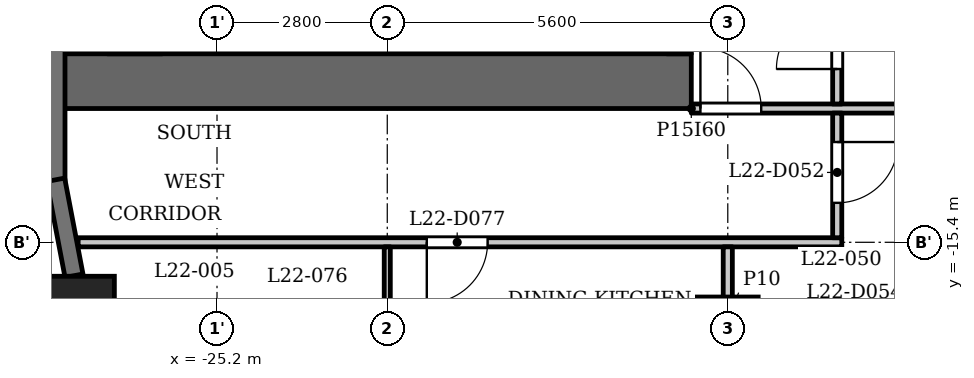
"""IFC4 building model, lengths in metres.
Left out: names, types, materials, properties, quantities, classifications, styles, units other than length and angle.
Written with IfcOpenShell. Run it as: python <this file> out.ifc"""

import sys

from ifc_helpers import new_model, si_unit, direction, frame, frame_2d, origin, origin_2d, place, context, subcontext, project, spatial, rectangle, extrude, element, fill, save


model = new_model("IFC4")
c1 = context("Model", 3, precision=1e-05, world=origin(), true_north=direction((0.0, 1.0)))
c2 = subcontext(c1, "Body", "Model", "MODEL_VIEW")
j1 = project(units=[si_unit("LENGTHUNIT", "METRE"), si_unit("PLANEANGLEUNIT", "RADIAN")], contexts=[c1])
p1 = place(None, origin())
s1 = spatial("IfcSite", under=j1, at=p1, CompositionType="ELEMENT")
p2 = place(p1, origin())
s2 = spatial("IfcBuilding", under=s1, at=p2, CompositionType="ELEMENT")
p3 = place(p2, frame((0.0, 0.0, 90.3)))
s3 = spatial("IfcBuildingStorey", under=s2, at=p3, CompositionType="ELEMENT", Elevation=90.3)
p4 = place(p3, frame((-27.538, -16.609, 0.0), z_axis=(0.0, 0.0, 1.0), x_axis=(1.0, 0.0, 0.0)))
e1 = element("IfcColumn", 1, at=p4, inside=s3, PredefinedType="COLUMN", context=c2, shape_type="SweptSolid", body=[
    extrude(rectangle(XDim=1.3, YDim=1.3, at=origin_2d()), origin(), (0.0, 0.0, 1.0), 3.5),
])
p5 = place(p3, frame((-16.8, -16.8, 0.0), z_axis=(0.0, 0.0, 1.0), x_axis=(1.0, 0.0, 0.0)))
e2 = element("IfcColumn", 2, at=p5, inside=s3, PredefinedType="COLUMN", context=c2, shape_type="SweptSolid", body=[
    extrude(rectangle(XDim=1.0, YDim=1.0, at=origin_2d()), origin(), (0.0, 0.0, 1.0), 3.5),
])
p6 = place(p3, frame((-27.85, -11.85, 0.0), z_axis=(0.0, 0.0, 1.0), x_axis=(0.0, -1.0, 0.0)))
e3 = element("IfcWall", 3, at=p6, inside=s3, PredefinedType="SOLIDWALL", context=c2, shape_type="SweptSolid", body=[
    extrude(rectangle(XDim=2.55, YDim=0.3, at=frame_2d((1.275, 0.0))), origin(), (0.0, 0.0, 1.0), 2.4),
])
p7 = place(p3, frame((-27.853, -14.372, 0.0), z_axis=(0.0, 0.0, 1.0), x_axis=(0.187279751651, -0.982306619453, 0.0)))
e4 = element("IfcWall", 4, at=p7, inside=s3, PredefinedType="SOLIDWALL", context=c2, shape_type="SweptSolid", body=[
    extrude(rectangle(XDim=1.606, YDim=0.3, at=frame_2d((0.803, 0.0))), origin(), (0.0, 0.0, 1.0), 2.4),
])
p8 = place(p3, frame((-17.4, -12.75, 0.0), z_axis=(0.0, 0.0, 1.0), x_axis=(-1.0, 0.0, 0.0)))
e5 = element("IfcWall", 5, at=p8, inside=s3, PredefinedType="SHEAR", context=c2, shape_type="SweptSolid", body=[
    extrude(rectangle(XDim=10.4, YDim=0.9, at=frame_2d((5.2, 0.0))), origin(), (0.0, 0.0, 1.0), 3.2),
])
p9 = place(p3, frame((-17.6, -12.3, 0.0), z_axis=(0.0, 0.0, 1.0), x_axis=(0.0, 1.0, 0.0)))
e6 = element("IfcWall", 6, at=p9, inside=s3, PredefinedType="SHEAR", context=c2, shape_type="SweptSolid", body=[
    extrude(rectangle(XDim=24.6, YDim=0.4, at=frame_2d((12.3, 0.0))), origin(), (0.0, 0.0, 1.0), 3.2),
])
p10 = place(p9, frame((6.0, 0.0, 0.0)))
e7 = element("IfcOpeningElement", 7, at=p10, cuts=e6, PredefinedType="OPENING", context=c2, shape_type="SweptSolid", body=[
    extrude(rectangle(XDim=1.1, YDim=2.1, at=frame_2d((0.55, 1.05))), frame((0.0, 0.21, 0.0), z_axis=(0.0, -1.0, 0.0), x_axis=(1.0, 0.0, 0.0)), (0.0, 0.0, 1.0), 0.42),
])
p11 = place(p9, frame((8.4, 0.0, 0.0)))
e8 = element("IfcOpeningElement", 8, at=p11, cuts=e6, PredefinedType="OPENING", context=c2, shape_type="SweptSolid", body=[
    extrude(rectangle(XDim=1.1, YDim=2.1, at=frame_2d((0.55, 1.05))), frame((0.0, 0.21, 0.0), z_axis=(0.0, -1.0, 0.0), x_axis=(1.0, 0.0, 0.0)), (0.0, 0.0, 1.0), 0.42),
])
p12 = place(p9, frame((10.8, 0.0, 0.0)))
e9 = element("IfcOpeningElement", 9, at=p12, cuts=e6, PredefinedType="OPENING", context=c2, shape_type="SweptSolid", body=[
    extrude(rectangle(XDim=1.1, YDim=2.1, at=frame_2d((0.55, 1.05))), frame((0.0, 0.21, 0.0), z_axis=(0.0, -1.0, 0.0), x_axis=(1.0, 0.0, 0.0)), (0.0, 0.0, 1.0), 0.42),
])
p13 = place(p9, frame((16.75, 0.0, 0.0)))
e10 = element("IfcOpeningElement", 10, at=p13, cuts=e6, PredefinedType="OPENING", context=c2, shape_type="SweptSolid", body=[
    extrude(rectangle(XDim=0.9, YDim=2.1, at=frame_2d((0.45, 1.05))), frame((0.0, 0.21, 0.0), z_axis=(0.0, -1.0, 0.0), x_axis=(1.0, 0.0, 0.0)), (0.0, 0.0, 1.0), 0.42),
])
p14 = place(p9, frame((22.8, 0.0, 0.0)))
e11 = element("IfcOpeningElement", 11, at=p14, cuts=e6, PredefinedType="OPENING", context=c2, shape_type="SweptSolid", body=[
    extrude(rectangle(XDim=1.1, YDim=2.1, at=frame_2d((0.55, 1.05))), frame((0.0, 0.21, 0.0), z_axis=(0.0, -1.0, 0.0), x_axis=(1.0, 0.0, 0.0)), (0.0, 0.0, 1.0), 0.42),
])
p15 = place(p9, frame((0.7, 0.0, 0.0)))
e12 = element("IfcOpeningElement", 12, at=p15, cuts=e6, PredefinedType="OPENING", context=c2, shape_type="SweptSolid", body=[
    extrude(rectangle(XDim=1.1, YDim=2.1, at=frame_2d((0.55, 1.05))), frame((0.0, 0.21, 0.0), z_axis=(0.0, -1.0, 0.0), x_axis=(1.0, 0.0, 0.0)), (0.0, 0.0, 1.0), 0.42),
])
p16 = place(p9, frame((12.775, 0.0, 0.0)))
e13 = element("IfcOpeningElement", 13, at=p16, cuts=e6, PredefinedType="OPENING", context=c2, shape_type="SweptSolid", body=[
    extrude(rectangle(XDim=1.8, YDim=2.1, at=frame_2d((0.9, 1.05))), frame((0.0, 0.21, 0.0), z_axis=(0.0, -1.0, 0.0), x_axis=(1.0, 0.0, 0.0)), (0.0, 0.0, 1.0), 0.42),
])
p17 = place(p3, frame((-26.55, -12.3, 0.0), z_axis=(0.0, 0.0, 1.0), x_axis=(0.0, 1.0, 0.0)))
e14 = element("IfcWall", 14, at=p17, inside=s3, PredefinedType="SHEAR", context=c2, shape_type="SweptSolid", body=[
    extrude(rectangle(XDim=24.6, YDim=0.9, at=frame_2d((12.3, 0.0))), origin(), (0.0, 0.0, 1.0), 3.2),
])
p18 = place(p3, frame((-23.55, -12.3, 0.0), z_axis=(0.0, 0.0, 1.0), x_axis=(0.0, 1.0, 0.0)))
e15 = element("IfcWall", 15, at=p18, inside=s3, PredefinedType="PARTITIONING", context=c2, shape_type="SweptSolid", body=[
    extrude(rectangle(XDim=2.5, YDim=0.2, at=frame_2d((1.25, 0.0))), origin(), (0.0, 0.0, 1.0), 3.2),
])
p19 = place(p18, frame((0.8, 0.0, 0.0)))
e16 = element("IfcOpeningElement", 16, at=p19, cuts=e15, PredefinedType="OPENING", context=c2, shape_type="SweptSolid", body=[
    extrude(rectangle(XDim=0.9, YDim=2.1, at=frame_2d((0.45, 1.05))), frame((0.0, 0.11, 0.0), z_axis=(0.0, -1.0, 0.0), x_axis=(1.0, 0.0, 0.0)), (0.0, 0.0, 1.0), 0.22),
])
p20 = place(p3, frame((-27.484, -15.4, 0.0), z_axis=(0.0, 0.0, 1.0), x_axis=(1.0, 0.0, 0.0)))
e17 = element("IfcWall", 17, at=p20, inside=s3, PredefinedType="PARTITIONING", context=c2, shape_type="SweptSolid", body=[
    extrude(rectangle(XDim=12.559, YDim=0.15, at=frame_2d((6.279, 0.0))), origin(), (0.0, 0.0, 1.0), 3.2),
])
p21 = place(p20, frame((5.734, 0.0, 0.0)))
e18 = element("IfcOpeningElement", 18, at=p21, cuts=e17, PredefinedType="OPENING", context=c2, shape_type="SweptSolid", body=[
    extrude(rectangle(XDim=1.0, YDim=2.1, at=frame_2d((0.5, 1.05))), frame((0.0, 0.085, 0.0), z_axis=(0.0, -1.0, 0.0), x_axis=(1.0, 0.0, 0.0)), (0.0, 0.0, 1.0), 0.17),
])
p22 = place(p3, frame((-17.4, -13.2, 0.0), z_axis=(0.0, 0.0, 1.0), x_axis=(1.0, 0.0, 0.0)))
e19 = element("IfcWall", 19, at=p22, inside=s3, PredefinedType="PARTITIONING", context=c2, shape_type="SweptSolid", body=[
    extrude(rectangle(XDim=34.8, YDim=0.15, at=frame_2d((17.4, 0.0))), origin(), (0.0, 0.0, 1.0), 3.2),
])
p23 = place(p22, frame((0.15, 0.0, 0.0)))
e20 = element("IfcOpeningElement", 20, at=p23, cuts=e19, PredefinedType="OPENING", context=c2, shape_type="SweptSolid", body=[
    extrude(rectangle(XDim=1.0, YDim=2.1, at=frame_2d((0.5, 1.05))), frame((0.0, 0.085, 0.0), z_axis=(0.0, -1.0, 0.0), x_axis=(1.0, 0.0, 0.0)), (0.0, 0.0, 1.0), 0.17),
])
p24 = place(p22, frame((33.55, 0.0, 0.0)))
e21 = element("IfcOpeningElement", 21, at=p24, cuts=e19, PredefinedType="OPENING", context=c2, shape_type="SweptSolid", body=[
    extrude(rectangle(XDim=1.0, YDim=2.1, at=frame_2d((0.5, 1.05))), frame((0.0, 0.085, 0.0), z_axis=(0.0, -1.0, 0.0), x_axis=(1.0, 0.0, 0.0)), (0.0, 0.0, 1.0), 0.17),
])
p25 = place(p22, frame((7.35, 0.0, 0.0)))
e22 = element("IfcOpeningElement", 22, at=p25, cuts=e19, PredefinedType="OPENING", context=c2, shape_type="SweptSolid", body=[
    extrude(rectangle(XDim=1.0, YDim=2.1, at=frame_2d((0.5, 1.05))), frame((0.0, 0.085, 0.0), z_axis=(0.0, -1.0, 0.0), x_axis=(1.0, 0.0, 0.0)), (0.0, 0.0, 1.0), 0.17),
])
p26 = place(p22, frame((13.7, 0.0, 0.0)))
e23 = element("IfcOpeningElement", 23, at=p26, cuts=e19, PredefinedType="OPENING", context=c2, shape_type="SweptSolid", body=[
    extrude(rectangle(XDim=1.0, YDim=2.1, at=frame_2d((0.5, 1.05))), frame((0.0, 0.085, 0.0), z_axis=(0.0, -1.0, 0.0), x_axis=(1.0, 0.0, 0.0)), (0.0, 0.0, 1.0), 0.17),
])
p27 = place(p22, frame((19.3, 0.0, 0.0)))
e24 = element("IfcOpeningElement", 24, at=p27, cuts=e19, PredefinedType="OPENING", context=c2, shape_type="SweptSolid", body=[
    extrude(rectangle(XDim=1.0, YDim=2.1, at=frame_2d((0.5, 1.05))), frame((0.0, 0.085, 0.0), z_axis=(0.0, -1.0, 0.0), x_axis=(1.0, 0.0, 0.0)), (0.0, 0.0, 1.0), 0.17),
])
p28 = place(p3, frame((-22.4, -17.75, 0.0), z_axis=(0.0, 0.0, 1.0), x_axis=(0.0, 1.0, 0.0)))
e25 = element("IfcWall", 25, at=p28, inside=s3, PredefinedType="PARTITIONING", context=c2, shape_type="SweptSolid", body=[
    extrude(rectangle(XDim=2.275, YDim=0.1, at=frame_2d((1.137, 0.0))), origin(), (0.0, 0.0, 1.0), 3.2),
])
p29 = place(p3, frame((-16.8, -23.03, 0.0), z_axis=(0.0, 0.0, 1.0), x_axis=(0.0, 1.0, 0.0)))
e26 = element("IfcWall", 26, at=p29, inside=s3, PredefinedType="PARTITIONING", context=c2, shape_type="SweptSolid", body=[
    extrude(rectangle(XDim=7.555, YDim=0.15, at=frame_2d((3.777, 0.0))), origin(), (0.0, 0.0, 1.0), 3.2),
])
p30 = place(p3, frame((-15.0, -15.325, 0.0), z_axis=(0.0, 0.0, 1.0), x_axis=(0.0, 1.0, 0.0)))
e27 = element("IfcWall", 27, at=p30, inside=s3, PredefinedType="PARTITIONING", context=c2, shape_type="SweptSolid", body=[
    extrude(rectangle(XDim=2.05, YDim=0.15, at=frame_2d((1.025, 0.0))), origin(), (0.0, 0.0, 1.0), 3.2),
])
p31 = place(p30, frame((0.574, 0.0, 0.0)))
e28 = element("IfcOpeningElement", 28, at=p31, cuts=e27, PredefinedType="OPENING", context=c2, shape_type="SweptSolid", body=[
    extrude(rectangle(XDim=1.0, YDim=2.1, at=frame_2d((0.5, 1.05))), frame((0.0, 0.085, 0.0), z_axis=(0.0, -1.0, 0.0), x_axis=(1.0, 0.0, 0.0)), (0.0, 0.0, 1.0), 0.17),
])
p32 = place(p3, frame((-15.0, -13.125, 0.0), z_axis=(0.0, 0.0, 1.0), x_axis=(0.0, 1.0, 0.0)))
e29 = element("IfcWall", 29, at=p32, inside=s3, PredefinedType="PARTITIONING", context=c2, shape_type="SweptSolid", body=[
    extrude(rectangle(XDim=6.356, YDim=0.15, at=frame_2d((3.178, 0.0))), origin(), (0.0, 0.0, 1.0), 3.2),
])
p33 = place(p32, frame((0.575, 0.0, 0.0)))
e30 = element("IfcOpeningElement", 30, at=p33, cuts=e29, PredefinedType="OPENING", context=c2, shape_type="SweptSolid", body=[
    extrude(rectangle(XDim=1.0, YDim=2.1, at=frame_2d((0.5, 1.05))), frame((0.0, 0.085, 0.0), z_axis=(0.0, -1.0, 0.0), x_axis=(1.0, 0.0, 0.0)), (0.0, 0.0, 1.0), 0.17),
])
p34 = place(p33, origin())
e31 = element("IfcDoor", 31, at=p34, inside=s3, OperationType="SINGLE_SWING_RIGHT", PredefinedType="DOOR", context=c2, shape_type="SweptSolid", body=[
    extrude(rectangle(XDim=1.0, YDim=2.1, at=frame_2d((0.5, 1.05))), frame((0.0, 0.025, 0.0), z_axis=(0.0, -1.0, 0.0), x_axis=(1.0, 0.0, 0.0)), (0.0, 0.0, 1.0), 0.05),
])
fill(e30, e31)
p35 = place(p23, origin())
e32 = element("IfcDoor", 32, at=p35, inside=s3, OperationType="SINGLE_SWING_RIGHT", PredefinedType="DOOR", context=c2, shape_type="SweptSolid", body=[
    extrude(rectangle(XDim=1.0, YDim=2.1, at=frame_2d((0.5, 1.05))), frame((0.0, 0.025, 0.0), z_axis=(0.0, -1.0, 0.0), x_axis=(1.0, 0.0, 0.0)), (0.0, 0.0, 1.0), 0.05),
])
fill(e20, e32)
p36 = place(p31, origin())
e33 = element("IfcDoor", 33, at=p36, inside=s3, OperationType="SINGLE_SWING_RIGHT", PredefinedType="DOOR", context=c2, shape_type="SweptSolid", body=[
    extrude(rectangle(XDim=1.0, YDim=2.1, at=frame_2d((0.5, 1.05))), frame((0.0, 0.025, 0.0), z_axis=(0.0, -1.0, 0.0), x_axis=(1.0, 0.0, 0.0)), (0.0, 0.0, 1.0), 0.05),
])
fill(e28, e33)
p37 = place(p21, origin())
e34 = element("IfcDoor", 34, at=p37, inside=s3, OperationType="SINGLE_SWING_LEFT", PredefinedType="DOOR", context=c2, shape_type="SweptSolid", body=[
    extrude(rectangle(XDim=1.0, YDim=2.1, at=frame_2d((0.5, 1.05))), frame((0.0, 0.025, 0.0), z_axis=(0.0, -1.0, 0.0), x_axis=(1.0, 0.0, 0.0)), (0.0, 0.0, 1.0), 0.05),
])
fill(e18, e34)
save(model, sys.argv[1])
